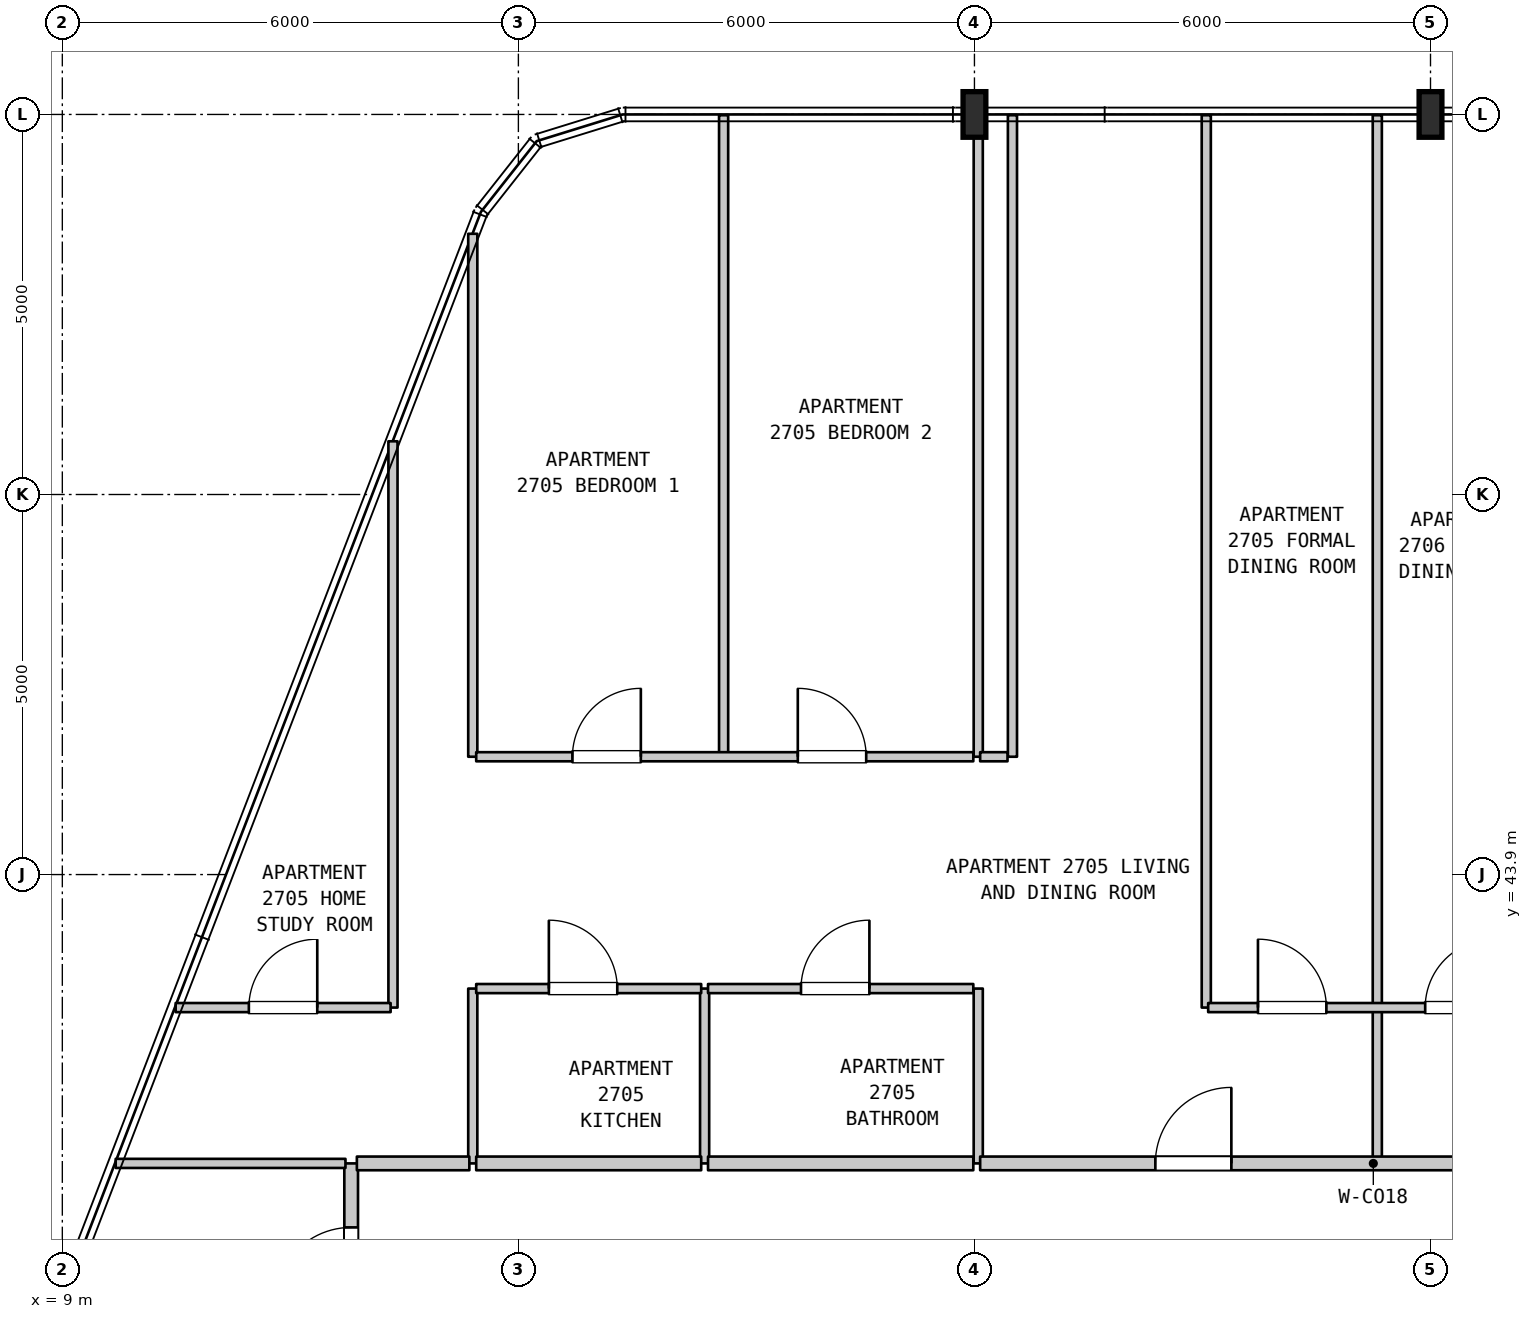
"""IFC4 building model, lengths in metres.
Left out: names, types, materials, properties, quantities, classifications, styles, units other than length and angle.
Written with IfcOpenShell. Run it as: python <this file> out.ifc"""

import sys

from ifc_helpers import new_model, si_unit, direction, frame, frame_2d, origin, origin_2d, place, context, subcontext, project, spatial, rectangle, i_section, extrude, element, fill, save


model = new_model("IFC4")
c1 = context("Model", 3, precision=1e-05, world=origin(), true_north=direction((0.0, 1.0)))
c2 = subcontext(c1, "Body", "Model", "MODEL_VIEW")
j1 = project(units=[si_unit("LENGTHUNIT", "METRE"), si_unit("PLANEANGLEUNIT", "RADIAN")], contexts=[c1])
p1 = place(None, origin())
s1 = spatial("IfcSite", under=j1, at=p1, CompositionType="ELEMENT")
p2 = place(p1, origin())
s2 = spatial("IfcBuilding", under=s1, at=p2, CompositionType="ELEMENT")
p3 = place(p2, frame((0.0, 0.0, 113.1)))
s3 = spatial("IfcBuildingStorey", under=s2, at=p3, CompositionType="ELEMENT", Elevation=113.1)
for number, where, z_axis, x_axis in (
    (1, (21.0, 53.9, 0.0), (0.0, 0.0, 1.0), (1.0, 0.0, 0.0)),
    (2, (27.0, 53.9, 0.0), (0.0, 0.0, 1.0), (1.0, 0.0, 0.0)),
):
    element("IfcColumn", number, at=place(p3, frame(where, z_axis=z_axis, x_axis=x_axis)), inside=s3, PredefinedType="COLUMN", context=c2, shape_type="SweptSolid", body=[
        extrude(i_section(OverallWidth=0.3, OverallDepth=0.6, WebThickness=0.015, FlangeThickness=0.03, FilletRadius=0.027, at=origin_2d()), origin(), (0.0, 0.0, 1.0), 3.7),
    ])
p4 = place(p3, frame((12.8, 37.416, 0.0), z_axis=(0.0, 0.0, 1.0), x_axis=(0.0, 1.0, 0.0)))
e3 = element("IfcWall", 3, at=p4, inside=s3, PredefinedType="STANDARD", context=c2, shape_type="SweptSolid", body=[
    extrude(rectangle(XDim=2.684, YDim=0.18, at=frame_2d((1.342, 0.0))), origin(), (0.0, 0.0, 1.0), 3.385),
])
p5 = place(p4, frame((0.842, 0.0, 0.0)))
e4 = element("IfcOpeningElement", 4, at=p5, cuts=e3, PredefinedType="OPENING", context=c2, shape_type="SweptSolid", body=[
    extrude(rectangle(XDim=1.0, YDim=2.15, at=frame_2d((0.5, 1.075))), frame((0.0, 0.1, 0.0), z_axis=(0.0, -1.0, 0.0), x_axis=(1.0, 0.0, 0.0)), (0.0, 0.0, 1.0), 0.2),
])
p6 = place(p3, frame((13.35, 42.15, 0.0), z_axis=(0.0, 0.0, 1.0), x_axis=(0.0, 1.0, 0.0)))
e5 = element("IfcWall", 5, at=p6, inside=s3, PredefinedType="PARTITIONING", context=c2, shape_type="SweptSolid", body=[
    extrude(rectangle(XDim=7.45, YDim=0.12, at=frame_2d((3.725, 0.0))), origin(), (0.0, 0.0, 1.0), 3.385),
])
p7 = place(p3, frame((14.4, 40.1, 0.0), z_axis=(0.0, 0.0, 1.0), x_axis=(0.0, 1.0, 0.0)))
e6 = element("IfcWall", 6, at=p7, inside=s3, PredefinedType="PARTITIONING", context=c2, shape_type="SweptSolid", body=[
    extrude(rectangle(XDim=2.3, YDim=0.12, at=frame_2d((1.15, 0.0))), origin(), (0.0, 0.0, 1.0), 3.385),
])
p8 = place(p3, frame((14.4, 45.45, 0.0), z_axis=(0.0, 0.0, 1.0), x_axis=(0.0, 1.0, 0.0)))
e7 = element("IfcWall", 7, at=p8, inside=s3, PredefinedType="PARTITIONING", context=c2, shape_type="SweptSolid", body=[
    extrude(rectangle(XDim=6.88, YDim=0.12, at=frame_2d((3.44, 0.0))), origin(), (0.0, 0.0, 1.0), 3.385),
])
p9 = place(p3, frame((17.45, 40.1, 0.0), z_axis=(0.0, 0.0, 1.0), x_axis=(0.0, 1.0, 0.0)))
e8 = element("IfcWall", 8, at=p9, inside=s3, PredefinedType="PARTITIONING", context=c2, shape_type="SweptSolid", body=[
    extrude(rectangle(XDim=2.3, YDim=0.12, at=frame_2d((1.15, 0.0))), origin(), (0.0, 0.0, 1.0), 3.385),
])
p10 = place(p3, frame((17.7, 45.45, 0.0), z_axis=(0.0, 0.0, 1.0), x_axis=(0.0, 1.0, 0.0)))
e9 = element("IfcWall", 9, at=p10, inside=s3, PredefinedType="PARTITIONING", context=c2, shape_type="SweptSolid", body=[
    extrude(rectangle(XDim=8.44, YDim=0.12, at=frame_2d((4.22, 0.0))), origin(), (0.0, 0.0, 1.0), 3.385),
])
p11 = place(p3, frame((21.05, 40.1, 0.0), z_axis=(0.0, 0.0, 1.0), x_axis=(0.0, 1.0, 0.0)))
e10 = element("IfcWall", 10, at=p11, inside=s3, PredefinedType="PARTITIONING", context=c2, shape_type="SweptSolid", body=[
    extrude(rectangle(XDim=2.3, YDim=0.12, at=frame_2d((1.15, 0.0))), origin(), (0.0, 0.0, 1.0), 3.085),
])
p12 = place(p3, frame((21.05, 45.45, 0.0), z_axis=(0.0, 0.0, 1.0), x_axis=(0.0, 1.0, 0.0)))
e11 = element("IfcWall", 11, at=p12, inside=s3, PredefinedType="PARTITIONING", context=c2, shape_type="SweptSolid", body=[
    extrude(rectangle(XDim=8.44, YDim=0.12, at=frame_2d((4.22, 0.0))), origin(), (0.0, 0.0, 1.0), 3.085),
])
p13 = place(p3, frame((21.5, 45.45, 0.0), z_axis=(0.0, 0.0, 1.0), x_axis=(0.0, 1.0, 0.0)))
e12 = element("IfcWall", 12, at=p13, inside=s3, PredefinedType="PARTITIONING", context=c2, shape_type="SweptSolid", body=[
    extrude(rectangle(XDim=8.44, YDim=0.12, at=frame_2d((4.22, 0.0))), origin(), (0.0, 0.0, 1.0), 3.385),
])
p14 = place(p3, frame((24.05, 42.15, 0.0), z_axis=(0.0, 0.0, 1.0), x_axis=(0.0, 1.0, 0.0)))
e13 = element("IfcWall", 13, at=p14, inside=s3, PredefinedType="PARTITIONING", context=c2, shape_type="SweptSolid", body=[
    extrude(rectangle(XDim=11.74, YDim=0.12, at=frame_2d((5.87, 0.0))), origin(), (0.0, 0.0, 1.0), 3.385),
])
p15 = place(p3, frame((26.3, 40.1, 0.0), z_axis=(0.0, 0.0, 1.0), x_axis=(0.0, 1.0, 0.0)))
e14 = element("IfcWall", 14, at=p15, inside=s3, PredefinedType="PARTITIONING", context=c2, shape_type="SweptSolid", body=[
    extrude(rectangle(XDim=2.05, YDim=0.12, at=frame_2d((1.025, 0.0))), origin(), (0.0, 0.0, 1.0), 3.385),
])
p16 = place(p3, frame((26.3, 42.15, 0.0), z_axis=(0.0, 0.0, 1.0), x_axis=(0.0, 1.0, 0.0)))
e15 = element("IfcWall", 15, at=p16, inside=s3, PredefinedType="PARTITIONING", context=c2, shape_type="SweptSolid", body=[
    extrude(rectangle(XDim=11.74, YDim=0.12, at=frame_2d((5.87, 0.0))), origin(), (0.0, 0.0, 1.0), 3.385),
])
p17 = place(p3, frame((9.702, 40.1, 0.0), z_axis=(0.0, 0.0, 1.0), x_axis=(1.0, 0.0, 0.0)))
e16 = element("IfcWall", 16, at=p17, inside=s3, PredefinedType="PARTITIONING", context=c2, shape_type="SweptSolid", body=[
    extrude(rectangle(XDim=3.023, YDim=0.12, at=frame_2d((1.512, 0.0))), origin(), (0.0, 0.0, 1.0), 3.385),
])
p18 = place(p3, frame((12.875, 40.1, 0.0), z_axis=(0.0, 0.0, 1.0), x_axis=(1.0, 0.0, 0.0)))
e17 = element("IfcWall", 17, at=p18, inside=s3, PredefinedType="STANDARD", context=c2, shape_type="SweptSolid", body=[
    extrude(rectangle(XDim=1.48, YDim=0.18, at=frame_2d((0.74, 0.0))), origin(), (0.0, 0.0, 1.0), 3.385),
])
p19 = place(p3, frame((14.445, 40.1, 0.0), z_axis=(0.0, 0.0, 1.0), x_axis=(1.0, 0.0, 0.0)))
e18 = element("IfcWall", 18, at=p19, inside=s3, PredefinedType="STANDARD", context=c2, shape_type="SweptSolid", body=[
    extrude(rectangle(XDim=2.96, YDim=0.18, at=frame_2d((1.48, 0.0))), origin(), (0.0, 0.0, 1.0), 3.385),
])
p20 = place(p3, frame((17.495, 40.1, 0.0), z_axis=(0.0, 0.0, 1.0), x_axis=(1.0, 0.0, 0.0)))
e19 = element("IfcWall", 19, at=p20, inside=s3, PredefinedType="STANDARD", context=c2, shape_type="SweptSolid", body=[
    extrude(rectangle(XDim=3.49, YDim=0.18, at=frame_2d((1.745, 0.0))), origin(), (0.0, 0.0, 1.0), 3.385),
])
p21 = place(p3, frame((21.075, 40.1, 0.0), z_axis=(0.0, 0.0, 1.0), x_axis=(1.0, 0.0, 0.0)))
e20 = element("IfcWall", 20, at=p21, inside=s3, PredefinedType="STANDARD", context=c2, shape_type="SweptSolid", body=[
    extrude(rectangle(XDim=10.345, YDim=0.18, at=frame_2d((5.172, 0.0))), origin(), (0.0, 0.0, 1.0), 3.385),
])
p22 = place(p21, frame((2.305, 0.0, 0.0)))
e21 = element("IfcOpeningElement", 21, at=p22, cuts=e20, PredefinedType="OPENING", context=c2, shape_type="SweptSolid", body=[
    extrude(rectangle(XDim=1.0, YDim=2.15, at=frame_2d((0.5, 1.075))), frame((0.0, 0.1, 0.0), z_axis=(0.0, -1.0, 0.0), x_axis=(1.0, 0.0, 0.0)), (0.0, 0.0, 1.0), 0.2),
])
p23 = place(p21, frame((7.235, 0.0, 0.0)))
e22 = element("IfcOpeningElement", 22, at=p23, cuts=e20, PredefinedType="OPENING", context=c2, shape_type="SweptSolid", body=[
    extrude(rectangle(XDim=1.0, YDim=2.15, at=frame_2d((0.5, 1.075))), frame((0.0, 0.1, 0.0), z_axis=(0.0, -1.0, 0.0), x_axis=(1.0, 0.0, 0.0)), (0.0, 0.0, 1.0), 0.2),
])
p24 = place(p3, frame((10.491, 42.15, 0.0), z_axis=(0.0, 0.0, 1.0), x_axis=(1.0, 0.0, 0.0)))
e23 = element("IfcWall", 23, at=p24, inside=s3, PredefinedType="PARTITIONING", context=c2, shape_type="SweptSolid", body=[
    extrude(rectangle(XDim=2.828, YDim=0.12, at=frame_2d((1.414, 0.0))), origin(), (0.0, 0.0, 1.0), 3.385),
])
p25 = place(p24, frame((0.963, 0.0, 0.0)))
e24 = element("IfcOpeningElement", 24, at=p25, cuts=e23, PredefinedType="OPENING", context=c2, shape_type="SweptSolid", body=[
    extrude(rectangle(XDim=0.9, YDim=2.15, at=frame_2d((0.45, 1.075))), frame((0.0, 0.07, 0.0), z_axis=(0.0, -1.0, 0.0), x_axis=(1.0, 0.0, 0.0)), (0.0, 0.0, 1.0), 0.14),
])
p26 = place(p3, frame((24.075, 42.15, 0.0), z_axis=(0.0, 0.0, 1.0), x_axis=(1.0, 0.0, 0.0)))
e25 = element("IfcWall", 25, at=p26, inside=s3, PredefinedType="PARTITIONING", context=c2, shape_type="SweptSolid", body=[
    extrude(rectangle(XDim=4.41, YDim=0.12, at=frame_2d((2.205, 0.0))), origin(), (0.0, 0.0, 1.0), 3.385),
])
p27 = place(p26, frame((0.655, 0.0, 0.0)))
e26 = element("IfcOpeningElement", 26, at=p27, cuts=e25, PredefinedType="OPENING", context=c2, shape_type="SweptSolid", body=[
    extrude(rectangle(XDim=0.9, YDim=2.15, at=frame_2d((0.45, 1.075))), frame((0.0, 0.07, 0.0), z_axis=(0.0, -1.0, 0.0), x_axis=(1.0, 0.0, 0.0)), (0.0, 0.0, 1.0), 0.14),
])
p28 = place(p26, frame((2.855, 0.0, 0.0)))
e27 = element("IfcOpeningElement", 27, at=p28, cuts=e25, PredefinedType="OPENING", context=c2, shape_type="SweptSolid", body=[
    extrude(rectangle(XDim=0.9, YDim=2.15, at=frame_2d((0.45, 1.075))), frame((0.0, 0.07, 0.0), z_axis=(0.0, -1.0, 0.0), x_axis=(1.0, 0.0, 0.0)), (0.0, 0.0, 1.0), 0.14),
])
p29 = place(p3, frame((14.445, 42.4, 0.0), z_axis=(0.0, 0.0, 1.0), x_axis=(1.0, 0.0, 0.0)))
e28 = element("IfcWall", 28, at=p29, inside=s3, PredefinedType="PARTITIONING", context=c2, shape_type="SweptSolid", body=[
    extrude(rectangle(XDim=2.96, YDim=0.12, at=frame_2d((1.48, 0.0))), origin(), (0.0, 0.0, 1.0), 3.385),
])
p30 = place(p29, frame((0.956, 0.0, 0.0)))
e29 = element("IfcOpeningElement", 29, at=p30, cuts=e28, PredefinedType="OPENING", context=c2, shape_type="SweptSolid", body=[
    extrude(rectangle(XDim=0.9, YDim=2.15, at=frame_2d((0.45, 1.075))), frame((0.0, 0.07, 0.0), z_axis=(0.0, -1.0, 0.0), x_axis=(1.0, 0.0, 0.0)), (0.0, 0.0, 1.0), 0.14),
])
p31 = place(p3, frame((17.495, 42.4, 0.0), z_axis=(0.0, 0.0, 1.0), x_axis=(1.0, 0.0, 0.0)))
e30 = element("IfcWall", 30, at=p31, inside=s3, PredefinedType="PARTITIONING", context=c2, shape_type="SweptSolid", body=[
    extrude(rectangle(XDim=3.49, YDim=0.12, at=frame_2d((1.745, 0.0))), origin(), (0.0, 0.0, 1.0), 3.385),
])
p32 = place(p31, frame((1.223, 0.0, 0.0)))
e31 = element("IfcOpeningElement", 31, at=p32, cuts=e30, PredefinedType="OPENING", context=c2, shape_type="SweptSolid", body=[
    extrude(rectangle(XDim=0.9, YDim=2.1, at=frame_2d((0.45, 1.05))), frame((0.0, 0.07, 0.0), z_axis=(0.0, -1.0, 0.0), x_axis=(1.0, 0.0, 0.0)), (0.0, 0.0, 1.0), 0.14),
])
p33 = place(p3, frame((14.445, 45.45, 0.0), z_axis=(0.0, 0.0, 1.0), x_axis=(1.0, 0.0, 0.0)))
e32 = element("IfcWall", 32, at=p33, inside=s3, PredefinedType="PARTITIONING", context=c2, shape_type="SweptSolid", body=[
    extrude(rectangle(XDim=6.54, YDim=0.12, at=frame_2d((3.27, 0.0))), origin(), (0.0, 0.0, 1.0), 3.385),
])
p34 = place(p33, frame((1.266, 0.0, 0.0)))
e33 = element("IfcOpeningElement", 33, at=p34, cuts=e32, PredefinedType="OPENING", context=c2, shape_type="SweptSolid", body=[
    extrude(rectangle(XDim=0.9, YDim=2.15, at=frame_2d((0.45, 1.075))), frame((0.0, 0.07, 0.0), z_axis=(0.0, -1.0, 0.0), x_axis=(1.0, 0.0, 0.0)), (0.0, 0.0, 1.0), 0.14),
])
p35 = place(p33, frame((4.231, 0.0, 0.0)))
e34 = element("IfcOpeningElement", 34, at=p35, cuts=e32, PredefinedType="OPENING", context=c2, shape_type="SweptSolid", body=[
    extrude(rectangle(XDim=0.9, YDim=2.15, at=frame_2d((0.45, 1.075))), frame((0.0, 0.07, 0.0), z_axis=(0.0, -1.0, 0.0), x_axis=(1.0, 0.0, 0.0)), (0.0, 0.0, 1.0), 0.14),
])
p36 = place(p3, frame((21.075, 45.45, 0.0), z_axis=(0.0, 0.0, 1.0), x_axis=(1.0, 0.0, 0.0)))
e35 = element("IfcWall", 35, at=p36, inside=s3, PredefinedType="PARTITIONING", context=c2, shape_type="SweptSolid", body=[
    extrude(rectangle(XDim=0.36, YDim=0.12, at=frame_2d((0.18, 0.0))), origin(), (0.0, 0.0, 1.0), 3.385),
])
p37 = place(p5, origin())
e36 = element("IfcDoor", 36, at=p37, inside=s3, OperationType="SINGLE_SWING_LEFT", PredefinedType="DOOR", context=c2, shape_type="SweptSolid", body=[
    extrude(rectangle(XDim=1.0, YDim=2.15, at=frame_2d((0.5, 1.075))), frame((0.0, 0.025, 0.0), z_axis=(0.0, -1.0, 0.0), x_axis=(1.0, 0.0, 0.0)), (0.0, 0.0, 1.0), 0.05),
])
fill(e4, e36)
p38 = place(p22, origin())
e37 = element("IfcDoor", 37, at=p38, inside=s3, OperationType="SINGLE_SWING_RIGHT", PredefinedType="DOOR", context=c2, shape_type="SweptSolid", body=[
    extrude(rectangle(XDim=1.0, YDim=2.15, at=frame_2d((0.5, 1.075))), frame((0.0, 0.025, 0.0), z_axis=(0.0, -1.0, 0.0), x_axis=(1.0, 0.0, 0.0)), (0.0, 0.0, 1.0), 0.05),
])
fill(e21, e37)
p39 = place(p25, origin())
e38 = element("IfcDoor", 38, at=p39, inside=s3, OperationType="SINGLE_SWING_RIGHT", PredefinedType="DOOR", context=c2, shape_type="SweptSolid", body=[
    extrude(rectangle(XDim=0.9, YDim=2.15, at=frame_2d((0.45, 1.075))), frame((0.0, 0.025, 0.0), z_axis=(0.0, -1.0, 0.0), x_axis=(1.0, 0.0, 0.0)), (0.0, 0.0, 1.0), 0.05),
])
fill(e24, e38)
p40 = place(p27, origin())
e39 = element("IfcDoor", 39, at=p40, inside=s3, OperationType="SINGLE_SWING_LEFT", PredefinedType="DOOR", context=c2, shape_type="SweptSolid", body=[
    extrude(rectangle(XDim=0.9, YDim=2.15, at=frame_2d((0.45, 1.075))), frame((0.0, 0.025, 0.0), z_axis=(0.0, -1.0, 0.0), x_axis=(1.0, 0.0, 0.0)), (0.0, 0.0, 1.0), 0.05),
])
fill(e26, e39)
p41 = place(p28, origin())
e40 = element("IfcDoor", 40, at=p41, inside=s3, OperationType="SINGLE_SWING_RIGHT", PredefinedType="DOOR", context=c2, shape_type="SweptSolid", body=[
    extrude(rectangle(XDim=0.9, YDim=2.15, at=frame_2d((0.45, 1.075))), frame((0.0, 0.025, 0.0), z_axis=(0.0, -1.0, 0.0), x_axis=(1.0, 0.0, 0.0)), (0.0, 0.0, 1.0), 0.05),
])
fill(e27, e40)
p42 = place(p30, origin())
e41 = element("IfcDoor", 41, at=p42, inside=s3, OperationType="SINGLE_SWING_LEFT", PredefinedType="DOOR", context=c2, shape_type="SweptSolid", body=[
    extrude(rectangle(XDim=0.9, YDim=2.15, at=frame_2d((0.45, 1.075))), frame((0.0, 0.025, 0.0), z_axis=(0.0, -1.0, 0.0), x_axis=(1.0, 0.0, 0.0)), (0.0, 0.0, 1.0), 0.05),
])
fill(e29, e41)
p43 = place(p32, origin())
e42 = element("IfcDoor", 42, at=p43, inside=s3, OperationType="SINGLE_SWING_RIGHT", PredefinedType="DOOR", context=c2, shape_type="SweptSolid", body=[
    extrude(rectangle(XDim=0.9, YDim=2.1, at=frame_2d((0.45, 1.05))), frame((0.0, 0.025, 0.0), z_axis=(0.0, -1.0, 0.0), x_axis=(1.0, 0.0, 0.0)), (0.0, 0.0, 1.0), 0.05),
])
fill(e31, e42)
p44 = place(p34, origin())
e43 = element("IfcDoor", 43, at=p44, inside=s3, OperationType="SINGLE_SWING_RIGHT", PredefinedType="DOOR", context=c2, shape_type="SweptSolid", body=[
    extrude(rectangle(XDim=0.9, YDim=2.15, at=frame_2d((0.45, 1.075))), frame((0.0, 0.025, 0.0), z_axis=(0.0, -1.0, 0.0), x_axis=(1.0, 0.0, 0.0)), (0.0, 0.0, 1.0), 0.05),
])
fill(e33, e43)
p45 = place(p35, origin())
e44 = element("IfcDoor", 44, at=p45, inside=s3, OperationType="SINGLE_SWING_LEFT", PredefinedType="DOOR", context=c2, shape_type="SweptSolid", body=[
    extrude(rectangle(XDim=0.9, YDim=2.15, at=frame_2d((0.45, 1.075))), frame((0.0, 0.025, 0.0), z_axis=(0.0, -1.0, 0.0), x_axis=(1.0, 0.0, 0.0)), (0.0, 0.0, 1.0), 0.05),
])
fill(e34, e44)
save(model, sys.argv[1])
